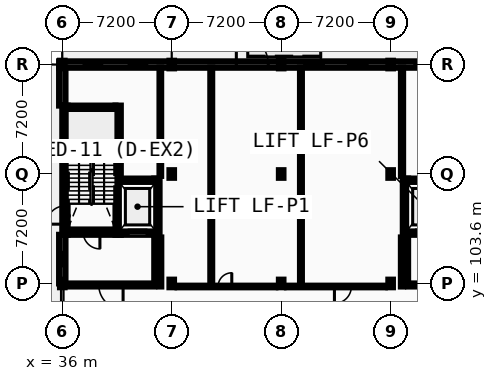
"""IFC4 building model, lengths in metres.
Left out: names, types, materials, properties, quantities, classifications, styles, units other than length and angle.
Written with IfcOpenShell. Run it as: python <this file> out.ifc"""

import sys

from ifc_helpers import new_model, si_unit, direction, frame, frame_2d, origin, origin_2d, place, context, subcontext, project, spatial, rectangle, i_section, extrude, element, fill, save


model = new_model("IFC4")
c1 = context("Model", 3, precision=1e-05, world=origin(), true_north=direction((0.0, 1.0)))
c2 = subcontext(c1, "Body", "Model", "MODEL_VIEW")
j1 = project(units=[si_unit("LENGTHUNIT", "METRE"), si_unit("PLANEANGLEUNIT", "RADIAN")], contexts=[c1])
p1 = place(None, origin())
s1 = spatial("IfcSite", under=j1, at=p1, CompositionType="ELEMENT")
p2 = place(p1, origin())
s2 = spatial("IfcBuilding", under=s1, at=p2, CompositionType="ELEMENT")
p3 = place(p2, origin())
s3 = spatial("IfcBuildingStorey", under=s2, at=p3, CompositionType="ELEMENT", Elevation=0.0)
for number, where, z_axis, x_axis in (
    (1, (36.0, 103.6, 0.0), (0.0, 0.0, 1.0), (1.0, 0.0, 0.0)),
    (2, (36.0, 118.0, 0.0), (0.0, 0.0, 1.0), (1.0, 0.0, 0.0)),
    (3, (43.2, 103.6, 0.0), (0.0, 0.0, 1.0), (1.0, 0.0, 0.0)),
    (4, (43.2, 110.8, 0.0), (0.0, 0.0, 1.0), (1.0, 0.0, 0.0)),
    (5, (43.2, 118.0, 0.0), (0.0, 0.0, 1.0), (1.0, 0.0, 0.0)),
    (6, (50.4, 103.6, 0.0), (0.0, 0.0, 1.0), (1.0, 0.0, 0.0)),
    (7, (50.4, 110.8, 0.0), (0.0, 0.0, 1.0), (1.0, 0.0, 0.0)),
    (8, (50.4, 118.0, 0.0), (0.0, 0.0, 1.0), (1.0, 0.0, 0.0)),
    (9, (57.6, 103.6, 0.0), (0.0, 0.0, 1.0), (1.0, 0.0, 0.0)),
    (10, (57.6, 110.8, 0.0), (0.0, 0.0, 1.0), (1.0, 0.0, 0.0)),
    (11, (57.6, 118.0, 0.0), (0.0, 0.0, 1.0), (1.0, 0.0, 0.0)),
):
    element("IfcColumn", number, at=place(p3, frame(where, z_axis=z_axis, x_axis=x_axis)), inside=s3, PredefinedType="COLUMN", context=c2, shape_type="SweptSolid", body=[
        extrude(i_section(OverallWidth=0.3, OverallDepth=0.5, WebThickness=0.014, FlangeThickness=0.028, FilletRadius=0.027, at=origin_2d()), origin(), (0.0, 0.0, 1.0), 5.2),
    ])
p4 = place(p3, frame((43.2, 118.0, 0.0), z_axis=(0.0, 0.0, 1.0), x_axis=(-1.0, 0.0, 0.0)))
e12 = element("IfcWall", 12, at=p4, inside=s3, PredefinedType="STANDARD", context=c2, shape_type="SweptSolid", body=[
    extrude(rectangle(XDim=7.41, YDim=0.42, at=frame_2d((3.705, 0.0))), origin(), (0.0, 0.0, 1.0), 4.665),
])
p5 = place(p4, frame((1.64, 0.0, 0.95)))
e13 = element("IfcOpeningElement", 13, at=p5, cuts=e12, PredefinedType="OPENING", context=c2, shape_type="SweptSolid", body=[
    extrude(rectangle(XDim=1.166, YDim=1.332, at=frame_2d((0.583, 0.666))), frame((0.0, 0.22, 0.0), z_axis=(0.0, -1.0, 0.0), x_axis=(1.0, 0.0, 0.0)), (0.0, 0.0, 1.0), 0.44),
])
p6 = place(p4, frame((4.604, 0.0, 0.95)))
e14 = element("IfcOpeningElement", 14, at=p6, cuts=e12, PredefinedType="OPENING", context=c2, shape_type="SweptSolid", body=[
    extrude(rectangle(XDim=1.166, YDim=1.332, at=frame_2d((0.583, 0.666))), frame((0.0, 0.22, 0.0), z_axis=(0.0, -1.0, 0.0), x_axis=(1.0, 0.0, 0.0)), (0.0, 0.0, 1.0), 0.44),
])
p7 = place(p3, frame((50.4, 118.0, 0.0), z_axis=(0.0, 0.0, 1.0), x_axis=(-1.0, 0.0, 0.0)))
e15 = element("IfcWall", 15, at=p7, inside=s3, PredefinedType="STANDARD", context=c2, shape_type="SweptSolid", body=[
    extrude(rectangle(XDim=7.2, YDim=0.42, at=frame_2d((3.6, 0.0))), origin(), (0.0, 0.0, 1.0), 4.665),
])
p8 = place(p7, frame((0.85, 0.0, 0.0)))
e16 = element("IfcOpeningElement", 16, at=p8, cuts=e15, PredefinedType="OPENING", context=c2, shape_type="SweptSolid", body=[
    extrude(rectangle(XDim=2.1, YDim=2.4, at=frame_2d((1.05, 1.2))), frame((0.0, 0.22, 0.0), z_axis=(0.0, -1.0, 0.0), x_axis=(1.0, 0.0, 0.0)), (0.0, 0.0, 1.0), 0.44),
])
p9 = place(p3, frame((57.6, 118.0, 0.0), z_axis=(0.0, 0.0, 1.0), x_axis=(-1.0, 0.0, 0.0)))
e17 = element("IfcWall", 17, at=p9, inside=s3, PredefinedType="STANDARD", context=c2, shape_type="SweptSolid", body=[
    extrude(rectangle(XDim=7.2, YDim=0.42, at=frame_2d((3.6, 0.0))), origin(), (0.0, 0.0, 1.0), 4.665),
])
p10 = place(p9, frame((1.543, 0.0, 0.95)))
e18 = element("IfcOpeningElement", 18, at=p10, cuts=e17, PredefinedType="OPENING", context=c2, shape_type="SweptSolid", body=[
    extrude(rectangle(XDim=1.234, YDim=1.332, at=frame_2d((0.617, 0.666))), frame((0.0, 0.22, 0.0), z_axis=(0.0, -1.0, 0.0), x_axis=(1.0, 0.0, 0.0)), (0.0, 0.0, 1.0), 0.44),
])
p11 = place(p9, frame((4.423, 0.0, 0.95)))
e19 = element("IfcOpeningElement", 19, at=p11, cuts=e17, PredefinedType="OPENING", context=c2, shape_type="SweptSolid", body=[
    extrude(rectangle(XDim=1.234, YDim=1.332, at=frame_2d((0.617, 0.666))), frame((0.0, 0.22, 0.0), z_axis=(0.0, -1.0, 0.0), x_axis=(1.0, 0.0, 0.0)), (0.0, 0.0, 1.0), 0.44),
])
p12 = place(p3, frame((65.01, 118.0, 0.0), z_axis=(0.0, 0.0, 1.0), x_axis=(-1.0, 0.0, 0.0)))
e20 = element("IfcWall", 20, at=p12, inside=s3, PredefinedType="STANDARD", context=c2, shape_type="SweptSolid", body=[
    extrude(rectangle(XDim=7.41, YDim=0.42, at=frame_2d((3.705, 0.0))), origin(), (0.0, 0.0, 1.0), 4.665),
])
p13 = place(p12, frame((1.589, 0.0, 0.95)))
e21 = element("IfcOpeningElement", 21, at=p13, cuts=e20, PredefinedType="OPENING", context=c2, shape_type="SweptSolid", body=[
    extrude(rectangle(XDim=1.268, YDim=1.332, at=frame_2d((0.634, 0.666))), frame((0.0, 0.22, 0.0), z_axis=(0.0, -1.0, 0.0), x_axis=(1.0, 0.0, 0.0)), (0.0, 0.0, 1.0), 0.44),
])
p14 = place(p12, frame((4.553, 0.0, 0.95)))
e22 = element("IfcOpeningElement", 22, at=p14, cuts=e20, PredefinedType="OPENING", context=c2, shape_type="SweptSolid", body=[
    extrude(rectangle(XDim=1.268, YDim=1.332, at=frame_2d((0.634, 0.666))), frame((0.0, 0.22, 0.0), z_axis=(0.0, -1.0, 0.0), x_axis=(1.0, 0.0, 0.0)), (0.0, 0.0, 1.0), 0.44),
])
p15 = place(p3, frame((36.0, 106.8, 0.0), z_axis=(0.0, 0.0, 1.0), x_axis=(0.0, -1.0, 0.0)))
e23 = element("IfcWall", 23, at=p15, inside=s3, PredefinedType="STANDARD", context=c2, shape_type="SweptSolid", body=[
    extrude(rectangle(XDim=3.2, YDim=0.42, at=frame_2d((1.6, 0.0))), origin(), (0.0, 0.0, 1.0), 4.97),
])
p16 = place(p15, frame((1.153, 0.0, 0.95)))
e24 = element("IfcOpeningElement", 24, at=p16, cuts=e23, PredefinedType="OPENING", context=c2, shape_type="SweptSolid", body=[
    extrude(rectangle(XDim=0.894, YDim=1.368, at=frame_2d((0.447, 0.684))), frame((0.0, 0.22, 0.0), z_axis=(0.0, -1.0, 0.0), x_axis=(1.0, 0.0, 0.0)), (0.0, 0.0, 1.0), 0.44),
])
p17 = place(p3, frame((36.0, 117.79, 0.0), z_axis=(0.0, 0.0, 1.0), x_axis=(0.0, -1.0, 0.0)))
e25 = element("IfcWall", 25, at=p17, inside=s3, PredefinedType="STANDARD", context=c2, shape_type="SweptSolid", body=[
    extrude(rectangle(XDim=2.49, YDim=0.42, at=frame_2d((1.245, 0.0))), origin(), (0.0, 0.0, 1.0), 4.97),
])
p18 = place(p3, frame((36.35, 106.975, 0.0), z_axis=(0.0, 0.0, 1.0), x_axis=(1.0, 0.0, 0.0)))
e26 = element("IfcWall", 26, at=p18, inside=s3, PredefinedType="SHEAR", context=c2, shape_type="SweptSolid", body=[
    extrude(rectangle(XDim=3.15, YDim=0.35, at=frame_2d((1.575, 0.0))), origin(), (0.0, 0.0, 1.0), 4.97),
])
p19 = place(p18, frame((1.025, 0.0, 0.0)))
e27 = element("IfcOpeningElement", 27, at=p19, cuts=e26, PredefinedType="OPENING", context=c2, shape_type="SweptSolid", body=[
    extrude(rectangle(XDim=1.1, YDim=2.15, at=frame_2d((0.55, 1.075))), frame((0.0, 0.185, 0.0), z_axis=(0.0, -1.0, 0.0), x_axis=(1.0, 0.0, 0.0)), (0.0, 0.0, 1.0), 0.37),
])
p20 = place(p3, frame((36.35, 115.125, 0.0), z_axis=(0.0, 0.0, 1.0), x_axis=(1.0, 0.0, 0.0)))
e28 = element("IfcWall", 28, at=p20, inside=s3, PredefinedType="SHEAR", context=c2, shape_type="SweptSolid", body=[
    extrude(rectangle(XDim=3.15, YDim=0.35, at=frame_2d((1.575, 0.0))), origin(), (0.0, 0.0, 1.0), 4.97),
])
p21 = place(p3, frame((36.175, 106.8, 0.0), z_axis=(0.0, 0.0, 1.0), x_axis=(0.0, 1.0, 0.0)))
e29 = element("IfcWall", 29, at=p21, inside=s3, PredefinedType="SHEAR", context=c2, shape_type="SweptSolid", body=[
    extrude(rectangle(XDim=8.5, YDim=0.35, at=frame_2d((4.25, 0.0))), origin(), (0.0, 0.0, 1.0), 4.97),
])
p22 = place(p21, frame((0.7, 0.0, 0.0)))
e30 = element("IfcOpeningElement", 30, at=p22, cuts=e29, PredefinedType="OPENING", context=c2, shape_type="SweptSolid", body=[
    extrude(rectangle(XDim=1.2, YDim=2.15, at=frame_2d((0.6, 1.075))), frame((0.0, 0.185, 0.0), z_axis=(0.0, -1.0, 0.0), x_axis=(1.0, 0.0, 0.0)), (0.0, 0.0, 1.0), 0.37),
])
p23 = place(p3, frame((39.675, 106.8, 0.0), z_axis=(0.0, 0.0, 1.0), x_axis=(0.0, 1.0, 0.0)))
e31 = element("IfcWall", 31, at=p23, inside=s3, PredefinedType="SHEAR", context=c2, shape_type="SweptSolid", body=[
    extrude(rectangle(XDim=8.5, YDim=0.35, at=frame_2d((4.25, 0.0))), origin(), (0.0, 0.0, 1.0), 4.97),
])
p24 = place(p3, frame((39.85, 106.975, 0.0), z_axis=(0.0, 0.0, 1.0), x_axis=(1.0, 0.0, 0.0)))
e32 = element("IfcWall", 32, at=p24, inside=s3, PredefinedType="SHEAR", context=c2, shape_type="SweptSolid", body=[
    extrude(rectangle(XDim=2.2, YDim=0.35, at=frame_2d((1.1, 0.0))), origin(), (0.0, 0.0, 1.0), 4.97),
])
p25 = place(p24, frame((0.5, 0.0, 0.0)))
e33 = element("IfcOpeningElement", 33, at=p25, cuts=e32, PredefinedType="OPENING", context=c2, shape_type="SweptSolid", body=[
    extrude(rectangle(XDim=1.2, YDim=2.2, at=frame_2d((0.6, 1.1))), frame((0.0, 0.185, 0.0), z_axis=(0.0, -1.0, 0.0), x_axis=(1.0, 0.0, 0.0)), (0.0, 0.0, 1.0), 0.37),
])
p26 = place(p3, frame((39.85, 110.325, 0.0), z_axis=(0.0, 0.0, 1.0), x_axis=(1.0, 0.0, 0.0)))
e34 = element("IfcWall", 34, at=p26, inside=s3, PredefinedType="SHEAR", context=c2, shape_type="SweptSolid", body=[
    extrude(rectangle(XDim=2.2, YDim=0.35, at=frame_2d((1.1, 0.0))), origin(), (0.0, 0.0, 1.0), 4.97),
])
p27 = place(p3, frame((42.225, 106.8, 0.0), z_axis=(0.0, 0.0, 1.0), x_axis=(0.0, 1.0, 0.0)))
e35 = element("IfcWall", 35, at=p27, inside=s3, PredefinedType="SHEAR", context=c2, shape_type="SweptSolid", body=[
    extrude(rectangle(XDim=3.7, YDim=0.35, at=frame_2d((1.85, 0.0))), origin(), (0.0, 0.0, 1.0), 4.97),
])
p28 = place(p3, frame((36.35, 103.5, 0.0), z_axis=(0.0, 0.0, 1.0), x_axis=(1.0, 0.0, 0.0)))
e36 = element("IfcWall", 36, at=p28, inside=s3, PredefinedType="PARTITIONING", context=c2, shape_type="SweptSolid", body=[
    extrude(rectangle(XDim=5.7, YDim=0.2, at=frame_2d((2.85, 0.0))), origin(), (0.0, 0.0, 1.0), 4.665),
])
p29 = place(p28, frame((2.05, 0.0, 0.0)))
e37 = element("IfcOpeningElement", 37, at=p29, cuts=e36, PredefinedType="OPENING", context=c2, shape_type="SweptSolid", body=[
    extrude(rectangle(XDim=1.6, YDim=2.2, at=frame_2d((0.8, 1.1))), frame((0.0, 0.11, 0.0), z_axis=(0.0, -1.0, 0.0), x_axis=(1.0, 0.0, 0.0)), (0.0, 0.0, 1.0), 0.22),
])
p30 = place(p3, frame((42.15, 103.6, 0.0), z_axis=(0.0, 0.0, 1.0), x_axis=(0.0, 1.0, 0.0)))
e38 = element("IfcWall", 38, at=p30, inside=s3, PredefinedType="PARTITIONING", context=c2, shape_type="SweptSolid", body=[
    extrude(rectangle(XDim=3.2, YDim=0.2, at=frame_2d((1.6, 0.0))), origin(), (0.0, 0.0, 1.0), 4.97),
])
p31 = place(p3, frame((58.75, 106.975, 0.0), z_axis=(0.0, 0.0, 1.0), x_axis=(1.0, 0.0, 0.0)))
e39 = element("IfcWall", 39, at=p31, inside=s3, PredefinedType="SHEAR", context=c2, shape_type="SweptSolid", body=[
    extrude(rectangle(XDim=2.2, YDim=0.35, at=frame_2d((1.1, 0.0))), origin(), (0.0, 0.0, 1.0), 4.97),
])
p32 = place(p31, frame((0.5, 0.0, 0.0)))
e40 = element("IfcOpeningElement", 40, at=p32, cuts=e39, PredefinedType="OPENING", context=c2, shape_type="SweptSolid", body=[
    extrude(rectangle(XDim=1.2, YDim=2.2, at=frame_2d((0.6, 1.1))), frame((0.0, 0.185, 0.0), z_axis=(0.0, -1.0, 0.0), x_axis=(1.0, 0.0, 0.0)), (0.0, 0.0, 1.0), 0.37),
])
p33 = place(p3, frame((58.75, 110.325, 0.0), z_axis=(0.0, 0.0, 1.0), x_axis=(1.0, 0.0, 0.0)))
e41 = element("IfcWall", 41, at=p33, inside=s3, PredefinedType="SHEAR", context=c2, shape_type="SweptSolid", body=[
    extrude(rectangle(XDim=2.2, YDim=0.35, at=frame_2d((1.1, 0.0))), origin(), (0.0, 0.0, 1.0), 4.97),
])
p34 = place(p3, frame((58.575, 106.8, 0.0), z_axis=(0.0, 0.0, 1.0), x_axis=(0.0, 1.0, 0.0)))
e42 = element("IfcWall", 42, at=p34, inside=s3, PredefinedType="SHEAR", context=c2, shape_type="SweptSolid", body=[
    extrude(rectangle(XDim=3.7, YDim=0.35, at=frame_2d((1.85, 0.0))), origin(), (0.0, 0.0, 1.0), 4.97),
])
p35 = place(p3, frame((58.75, 103.5, 0.0), z_axis=(0.0, 0.0, 1.0), x_axis=(1.0, 0.0, 0.0)))
e43 = element("IfcWall", 43, at=p35, inside=s3, PredefinedType="PARTITIONING", context=c2, shape_type="SweptSolid", body=[
    extrude(rectangle(XDim=5.7, YDim=0.2, at=frame_2d((2.85, 0.0))), origin(), (0.0, 0.0, 1.0), 4.665),
])
p36 = place(p35, frame((2.05, 0.0, 0.0)))
e44 = element("IfcOpeningElement", 44, at=p36, cuts=e43, PredefinedType="OPENING", context=c2, shape_type="SweptSolid", body=[
    extrude(rectangle(XDim=1.6, YDim=2.2, at=frame_2d((0.8, 1.1))), frame((0.0, 0.11, 0.0), z_axis=(0.0, -1.0, 0.0), x_axis=(1.0, 0.0, 0.0)), (0.0, 0.0, 1.0), 0.22),
])
p37 = place(p3, frame((58.65, 103.6, 0.0), z_axis=(0.0, 0.0, 1.0), x_axis=(0.0, 1.0, 0.0)))
e45 = element("IfcWall", 45, at=p37, inside=s3, PredefinedType="PARTITIONING", context=c2, shape_type="SweptSolid", body=[
    extrude(rectangle(XDim=3.2, YDim=0.2, at=frame_2d((1.6, 0.0))), origin(), (0.0, 0.0, 1.0), 4.97),
])
p38 = place(p3, frame((43.58, 103.4, 0.0), z_axis=(0.0, 0.0, 1.0), x_axis=(1.0, 0.0, 0.0)))
e46 = element("IfcWall", 46, at=p38, inside=s3, PredefinedType="PARTITIONING", context=c2, shape_type="SweptSolid", body=[
    extrude(rectangle(XDim=6.44, YDim=0.11, at=frame_2d((3.22, 0.0))), origin(), (0.0, 0.0, 1.0), 4.665),
])
p39 = place(p38, frame((0.61, 0.0, 0.0)))
e47 = element("IfcOpeningElement", 47, at=p39, cuts=e46, PredefinedType="OPENING", context=c2, shape_type="SweptSolid", body=[
    extrude(rectangle(XDim=1.0, YDim=2.1, at=frame_2d((0.5, 1.05))), frame((0.0, 0.065, 0.0), z_axis=(0.0, -1.0, 0.0), x_axis=(1.0, 0.0, 0.0)), (0.0, 0.0, 1.0), 0.13),
])
p40 = place(p38, frame((2.67, 0.0, 0.0)))
e48 = element("IfcOpeningElement", 48, at=p40, cuts=e46, PredefinedType="OPENING", context=c2, shape_type="SweptSolid", body=[
    extrude(rectangle(XDim=0.9, YDim=2.1, at=frame_2d((0.45, 1.05))), frame((0.0, 0.065, 0.0), z_axis=(0.0, -1.0, 0.0), x_axis=(1.0, 0.0, 0.0)), (0.0, 0.0, 1.0), 0.13),
])
p41 = place(p3, frame((50.78, 103.4, 0.0), z_axis=(0.0, 0.0, 1.0), x_axis=(1.0, 0.0, 0.0)))
e49 = element("IfcWall", 49, at=p41, inside=s3, PredefinedType="PARTITIONING", context=c2, shape_type="SweptSolid", body=[
    extrude(rectangle(XDim=6.44, YDim=0.11, at=frame_2d((3.22, 0.0))), origin(), (0.0, 0.0, 1.0), 4.665),
])
p42 = place(p41, frame((3.123, 0.0, 0.0)))
e50 = element("IfcOpeningElement", 50, at=p42, cuts=e49, PredefinedType="OPENING", context=c2, shape_type="SweptSolid", body=[
    extrude(rectangle(XDim=1.114, YDim=2.096, at=frame_2d((0.557, 1.048))), frame((0.0, 0.065, 0.0), z_axis=(0.0, -1.0, 0.0), x_axis=(1.0, 0.0, 0.0)), (0.0, 0.0, 1.0), 0.13),
])
p43 = place(p3, frame((42.45, 103.4, 0.0), z_axis=(0.0, 0.0, 1.0), x_axis=(0.0, 1.0, 0.0)))
e51 = element("IfcWall", 51, at=p43, inside=s3, PredefinedType="PARTITIONING", context=c2, shape_type="SweptSolid", body=[
    extrude(rectangle(XDim=3.225, YDim=0.125, at=frame_2d((1.613, 0.0))), origin(), (0.0, 0.0, 1.0), 4.97),
])
p44 = place(p3, frame((42.45, 110.675, 0.0), z_axis=(0.0, 0.0, 1.0), x_axis=(0.0, 1.0, 0.0)))
e52 = element("IfcWall", 52, at=p44, inside=s3, PredefinedType="PARTITIONING", context=c2, shape_type="SweptSolid", body=[
    extrude(rectangle(XDim=7.125, YDim=0.11, at=frame_2d((3.562, 0.0))), origin(), (0.0, 0.0, 1.0), 4.97),
])
p45 = place(p3, frame((45.8, 103.455, 0.0), z_axis=(0.0, 0.0, 1.0), x_axis=(0.0, 1.0, 0.0)))
e53 = element("IfcWall", 53, at=p45, inside=s3, PredefinedType="PARTITIONING", context=c2, shape_type="SweptSolid", body=[
    extrude(rectangle(XDim=14.345, YDim=0.125, at=frame_2d((7.172, 0.0))), origin(), (0.0, 0.0, 1.0), 4.655),
])
p46 = place(p3, frame((51.7, 103.455, 0.0), z_axis=(0.0, 0.0, 1.0), x_axis=(0.0, 1.0, 0.0)))
e54 = element("IfcWall", 54, at=p46, inside=s3, PredefinedType="PARTITIONING", context=c2, shape_type="SweptSolid", body=[
    extrude(rectangle(XDim=14.345, YDim=0.125, at=frame_2d((7.172, 0.0))), origin(), (0.0, 0.0, 1.0), 4.97),
])
p47 = place(p3, frame((58.35, 103.4, 0.0), z_axis=(0.0, 0.0, 1.0), x_axis=(0.0, 1.0, 0.0)))
e55 = element("IfcWall", 55, at=p47, inside=s3, PredefinedType="PARTITIONING", context=c2, shape_type="SweptSolid", body=[
    extrude(rectangle(XDim=3.225, YDim=0.15, at=frame_2d((1.613, 0.0))), origin(), (0.0, 0.0, 1.0), 4.97),
])
p48 = place(p3, frame((58.35, 110.675, 0.0), z_axis=(0.0, 0.0, 1.0), x_axis=(0.0, 1.0, 0.0)))
e56 = element("IfcWall", 56, at=p48, inside=s3, PredefinedType="PARTITIONING", context=c2, shape_type="SweptSolid", body=[
    extrude(rectangle(XDim=7.125, YDim=0.142, at=frame_2d((3.562, 0.0))), origin(), (0.0, 0.0, 1.0), 4.97),
])
p49 = place(p5, origin())
e57 = element("IfcWindow", 57, at=p49, inside=s3, PartitioningType="SINGLE_PANEL", PredefinedType="WINDOW", context=c2, shape_type="SweptSolid", body=[
    extrude(rectangle(XDim=1.166, YDim=1.332, at=frame_2d((0.583, 0.666))), frame((0.0, 0.03, 0.0), z_axis=(0.0, -1.0, 0.0), x_axis=(1.0, 0.0, 0.0)), (0.0, 0.0, 1.0), 0.06),
])
fill(e13, e57)
p50 = place(p6, origin())
e58 = element("IfcWindow", 58, at=p50, inside=s3, PartitioningType="SINGLE_PANEL", PredefinedType="WINDOW", context=c2, shape_type="SweptSolid", body=[
    extrude(rectangle(XDim=1.166, YDim=1.332, at=frame_2d((0.583, 0.666))), frame((0.0, 0.03, 0.0), z_axis=(0.0, -1.0, 0.0), x_axis=(1.0, 0.0, 0.0)), (0.0, 0.0, 1.0), 0.06),
])
fill(e14, e58)
p51 = place(p10, origin())
e59 = element("IfcWindow", 59, at=p51, inside=s3, PartitioningType="SINGLE_PANEL", PredefinedType="WINDOW", context=c2, shape_type="SweptSolid", body=[
    extrude(rectangle(XDim=1.234, YDim=1.332, at=frame_2d((0.617, 0.666))), frame((0.0, 0.03, 0.0), z_axis=(0.0, -1.0, 0.0), x_axis=(1.0, 0.0, 0.0)), (0.0, 0.0, 1.0), 0.06),
])
fill(e18, e59)
p52 = place(p11, origin())
e60 = element("IfcWindow", 60, at=p52, inside=s3, PartitioningType="SINGLE_PANEL", PredefinedType="WINDOW", context=c2, shape_type="SweptSolid", body=[
    extrude(rectangle(XDim=1.234, YDim=1.332, at=frame_2d((0.617, 0.666))), frame((0.0, 0.03, 0.0), z_axis=(0.0, -1.0, 0.0), x_axis=(1.0, 0.0, 0.0)), (0.0, 0.0, 1.0), 0.06),
])
fill(e19, e60)
p53 = place(p14, origin())
e61 = element("IfcWindow", 61, at=p53, inside=s3, PartitioningType="SINGLE_PANEL", PredefinedType="WINDOW", context=c2, shape_type="SweptSolid", body=[
    extrude(rectangle(XDim=1.268, YDim=1.332, at=frame_2d((0.634, 0.666))), frame((0.0, 0.03, 0.0), z_axis=(0.0, -1.0, 0.0), x_axis=(1.0, 0.0, 0.0)), (0.0, 0.0, 1.0), 0.06),
])
fill(e22, e61)
p54 = place(p16, origin())
e62 = element("IfcWindow", 62, at=p54, inside=s3, PartitioningType="SINGLE_PANEL", PredefinedType="WINDOW", context=c2, shape_type="SweptSolid", body=[
    extrude(rectangle(XDim=0.894, YDim=1.368, at=frame_2d((0.447, 0.684))), frame((0.0, 0.03, 0.0), z_axis=(0.0, -1.0, 0.0), x_axis=(1.0, 0.0, 0.0)), (0.0, 0.0, 1.0), 0.06),
])
fill(e24, e62)
p55 = place(p8, origin())
e63 = element("IfcDoor", 63, at=p55, inside=s3, OperationType="DOUBLE_DOOR_SINGLE_SWING", PredefinedType="DOOR", context=c2, shape_type="SweptSolid", body=[
    extrude(rectangle(XDim=2.1, YDim=2.4, at=frame_2d((1.05, 1.2))), frame((0.0, 0.025, 0.0), z_axis=(0.0, -1.0, 0.0), x_axis=(1.0, 0.0, 0.0)), (0.0, 0.0, 1.0), 0.05),
])
fill(e16, e63)
p56 = place(p19, origin())
e64 = element("IfcDoor", 64, at=p56, inside=s3, OperationType="SINGLE_SWING_RIGHT", PredefinedType="DOOR", context=c2, shape_type="SweptSolid", body=[
    extrude(rectangle(XDim=1.1, YDim=2.15, at=frame_2d((0.55, 1.075))), frame((0.0, 0.025, 0.0), z_axis=(0.0, -1.0, 0.0), x_axis=(1.0, 0.0, 0.0)), (0.0, 0.0, 1.0), 0.05),
])
fill(e27, e64)
p57 = place(p22, origin())
e65 = element("IfcDoor", 65, at=p57, inside=s3, OperationType="SINGLE_SWING_LEFT", PredefinedType="DOOR", context=c2, shape_type="SweptSolid", body=[
    extrude(rectangle(XDim=1.2, YDim=2.15, at=frame_2d((0.6, 1.075))), frame((0.0, 0.025, 0.0), z_axis=(0.0, -1.0, 0.0), x_axis=(1.0, 0.0, 0.0)), (0.0, 0.0, 1.0), 0.05),
])
fill(e30, e65)
p58 = place(p25, origin())
e66 = element("IfcDoor", 66, at=p58, inside=s3, OperationType="SLIDING_TO_RIGHT", PredefinedType="DOOR", context=c2, shape_type="SweptSolid", body=[
    extrude(rectangle(XDim=1.2, YDim=2.2, at=frame_2d((0.6, 1.1))), frame((0.0, 0.025, 0.0), z_axis=(0.0, -1.0, 0.0), x_axis=(1.0, 0.0, 0.0)), (0.0, 0.0, 1.0), 0.05),
])
fill(e33, e66)
p59 = place(p29, origin())
e67 = element("IfcDoor", 67, at=p59, inside=s3, OperationType="DOUBLE_DOOR_SINGLE_SWING", PredefinedType="DOOR", context=c2, shape_type="SweptSolid", body=[
    extrude(rectangle(XDim=1.6, YDim=2.2, at=frame_2d((0.8, 1.1))), frame((0.0, 0.025, 0.0), z_axis=(0.0, -1.0, 0.0), x_axis=(1.0, 0.0, 0.0)), (0.0, 0.0, 1.0), 0.05),
])
fill(e37, e67)
p60 = place(p32, origin())
e68 = element("IfcDoor", 68, at=p60, inside=s3, OperationType="SLIDING_TO_RIGHT", PredefinedType="DOOR", context=c2, shape_type="SweptSolid", body=[
    extrude(rectangle(XDim=1.2, YDim=2.2, at=frame_2d((0.6, 1.1))), frame((0.0, 0.025, 0.0), z_axis=(0.0, -1.0, 0.0), x_axis=(1.0, 0.0, 0.0)), (0.0, 0.0, 1.0), 0.05),
])
fill(e40, e68)
p61 = place(p39, frame((1.0, 0.0, 0.0), z_axis=(0.0, 0.0, 1.0), x_axis=(-1.0, 0.0, 0.0)))
e69 = element("IfcDoor", 69, at=p61, inside=s3, OperationType="SLIDING_TO_LEFT", PredefinedType="DOOR", context=c2, shape_type="SweptSolid", body=[
    extrude(rectangle(XDim=1.0, YDim=2.1, at=frame_2d((0.5, 1.05))), frame((0.0, 0.025, 0.0), z_axis=(0.0, -1.0, 0.0), x_axis=(1.0, 0.0, 0.0)), (0.0, 0.0, 1.0), 0.05),
])
fill(e47, e69)
p62 = place(p40, frame((0.9, 0.0, 0.0), z_axis=(0.0, 0.0, 1.0), x_axis=(-1.0, 0.0, 0.0)))
e70 = element("IfcDoor", 70, at=p62, inside=s3, OperationType="SINGLE_SWING_RIGHT", PredefinedType="DOOR", context=c2, shape_type="SweptSolid", body=[
    extrude(rectangle(XDim=0.9, YDim=2.1, at=frame_2d((0.45, 1.05))), frame((0.0, 0.025, 0.0), z_axis=(0.0, -1.0, 0.0), x_axis=(1.0, 0.0, 0.0)), (0.0, 0.0, 1.0), 0.05),
])
fill(e48, e70)
p63 = place(p42, frame((1.114, 0.0, 0.0), z_axis=(0.0, 0.0, 1.0), x_axis=(-1.0, 0.0, 0.0)))
e71 = element("IfcDoor", 71, at=p63, inside=s3, OperationType="SINGLE_SWING_LEFT", PredefinedType="DOOR", context=c2, shape_type="SweptSolid", body=[
    extrude(rectangle(XDim=1.114, YDim=2.096, at=frame_2d((0.557, 1.048))), frame((0.0, 0.025, 0.0), z_axis=(0.0, -1.0, 0.0), x_axis=(1.0, 0.0, 0.0)), (0.0, 0.0, 1.0), 0.05),
])
fill(e50, e71)
save(model, sys.argv[1])
